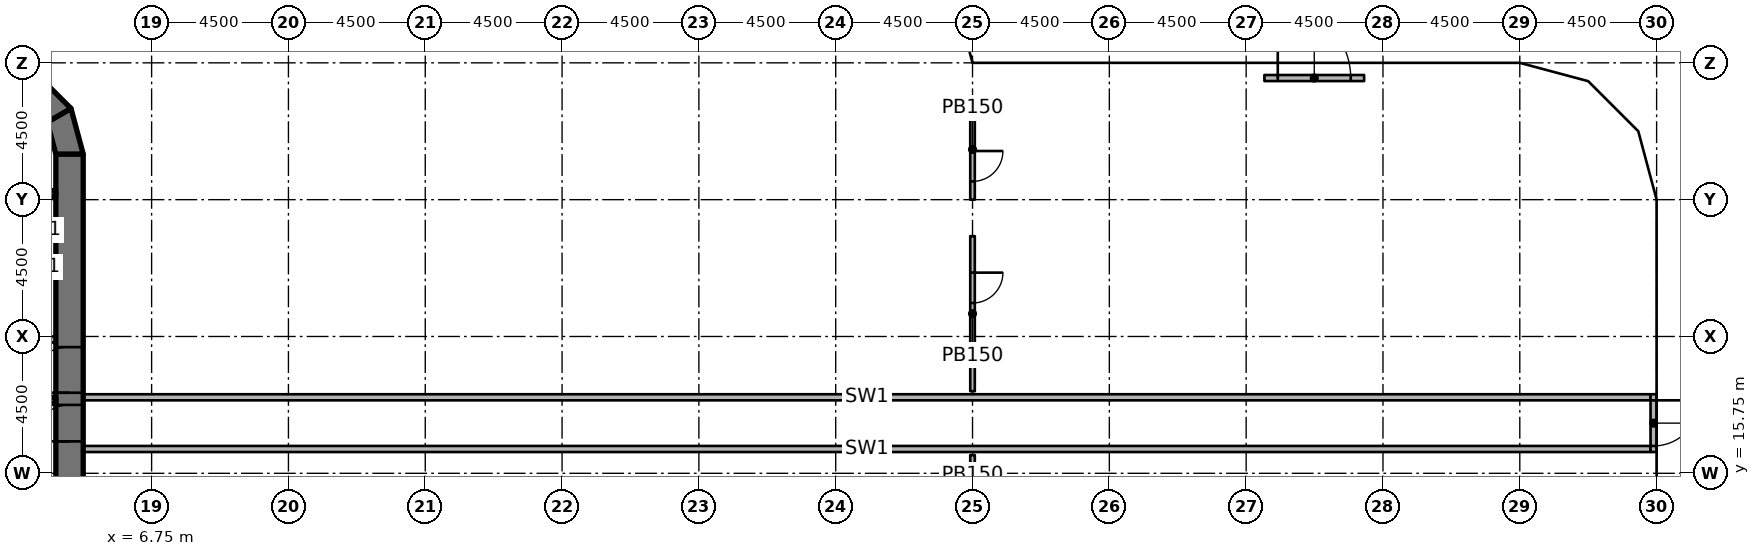
"""IFC4 building model, lengths in metres.
Left out: names, types, materials, properties, quantities, classifications, styles, units other than length and angle.
Written with IfcOpenShell. Run it as: python <this file> out.ifc"""

import sys

from ifc_helpers import new_model, si_unit, direction, frame, frame_2d, origin, origin_2d, place, context, subcontext, project, spatial, polyline, rectangle, outline, extrude, element, fill, save


model = new_model("IFC4")
c1 = context("Model", 3, precision=1e-05, world=origin(), true_north=direction((0.0, 1.0)))
c2 = subcontext(c1, "Body", "Model", "MODEL_VIEW")
j1 = project(units=[si_unit("LENGTHUNIT", "METRE"), si_unit("PLANEANGLEUNIT", "RADIAN")], contexts=[c1])
p1 = place(None, origin())
s1 = spatial("IfcSite", under=j1, at=p1, CompositionType="ELEMENT")
p2 = place(p1, origin())
s2 = spatial("IfcBuilding", under=s1, at=p2, CompositionType="ELEMENT")
p3 = place(p2, origin())
s3 = spatial("IfcBuildingStorey", under=s2, at=p3, CompositionType="ELEMENT", Elevation=0.0)
for number, where, z_axis, x_axis in (
    (1, (6.25, 15.75, 0.0), (0.0, 0.0, 1.0), (1.0, 0.0, 0.0)),
    (2, (6.25, 20.25, 0.0), (0.0, 0.0, 1.0), (1.0, 0.0, 0.0)),
    (3, (6.25, 24.65, 0.0), (0.0, 0.0, 1.0), (1.0, 0.0, 0.0)),
    (4, (6.25, 26.7, 0.0), (0.0, 0.0, 1.0), (1.0, 0.0, 0.0)),
    (5, (10.65, 15.15, 0.0), (0.0, 0.0, 1.0), (1.0, 0.0, 0.0)),
    (6, (10.65, 20.25, 0.0), (0.0, 0.0, 1.0), (1.0, 0.0, 0.0)),
    (7, (15.15, 19.65, 0.0), (0.0, 0.0, 1.0), (1.0, 0.0, 0.0)),
    (8, (15.15, 29.25, 0.0), (0.0, 0.0, 1.0), (1.0, 0.0, 0.0)),
    (9, (19.65, 15.15, 0.0), (0.0, 0.0, 1.0), (1.0, 0.0, 0.0)),
    (10, (19.65, 24.15, 0.0), (0.0, 0.0, 1.0), (1.0, 0.0, 0.0)),
    (11, (24.15, 19.65, 0.0), (0.0, 0.0, 1.0), (1.0, 0.0, 0.0)),
    (12, (24.15, 28.65, 0.0), (0.0, 0.0, 1.0), (1.0, 0.0, 0.0)),
    (13, (29.25, 15.15, 0.0), (0.0, 0.0, 1.0), (1.0, 0.0, 0.0)),
    (14, (28.65, 24.15, 0.0), (0.0, 0.0, 1.0), (1.0, 0.0, 0.0)),
    (15, (33.75, 24.15, 0.0), (0.0, 0.0, 1.0), (1.0, 0.0, 0.0)),
    (16, (33.15, 28.65, 0.0), (0.0, 0.0, 1.0), (1.0, 0.0, 0.0)),
    (17, (38.25, 19.65, 0.0), (0.0, 0.0, 1.0), (1.0, 0.0, 0.0)),
    (18, (42.75, 28.65, 0.0), (0.0, 0.0, 1.0), (1.0, 0.0, 0.0)),
    (19, (47.25, 23.97, 0.0), (0.0, 0.0, 1.0), (1.0, 0.0, 0.0)),
    (20, (50.97, 20.25, 0.0), (0.0, 0.0, 1.0), (1.0, 0.0, 0.0)),
    (21, (55.65, 15.75, 0.0), (0.0, 0.0, 1.0), (1.0, 0.0, 0.0)),
):
    element("IfcColumn", number, at=place(p3, frame(where, z_axis=z_axis, x_axis=x_axis)), inside=s3, PredefinedType="COLUMN", context=c2, shape_type="SweptSolid", body=[
        extrude(rectangle(XDim=1.2, YDim=1.2, at=origin_2d()), origin(), (0.0, 0.0, 1.0), 6.55),
    ])
p4 = place(p3, frame((4.05, 11.25, 0.0), z_axis=(0.0, 0.0, 1.0), x_axis=(0.0, 1.0, 0.0)))
e22 = element("IfcWall", 22, at=p4, inside=s3, PredefinedType="SHEAR", context=c2, shape_type="SweptSolid", body=[
    extrude(rectangle(XDim=15.0, YDim=0.9, at=frame_2d((7.5, 0.0))), origin(), (0.0, 0.0, 1.0), 7.0),
])
p5 = place(p4, frame((7.15, 0.0, 0.0)))
e23 = element("IfcOpeningElement", 23, at=p5, cuts=e22, PredefinedType="OPENING", context=c2, shape_type="SweptSolid", body=[
    extrude(rectangle(XDim=1.5, YDim=2.3, at=frame_2d((0.75, 1.15))), frame((0.0, 0.46, 0.0), z_axis=(0.0, -1.0, 0.0), x_axis=(1.0, 0.0, 0.0)), (0.0, 0.0, 1.0), 0.92),
])
p6 = place(p4, frame((5.55, 0.0, 0.0)))
e24 = element("IfcOpeningElement", 24, at=p6, cuts=e22, PredefinedType="OPENING", context=c2, shape_type="SweptSolid", body=[
    extrude(rectangle(XDim=1.2, YDim=2.1, at=frame_2d((0.6, 1.05))), frame((0.0, 0.46, 0.0), z_axis=(0.0, -1.0, 0.0), x_axis=(1.0, 0.0, 0.0)), (0.0, 0.0, 1.0), 0.92),
])
p7 = place(p3, origin())
e25 = element("IfcWall", 25, at=p7, inside=s3, PredefinedType="SHEAR", context=c2, shape_type="SweptSolid", body=[
    extrude(outline(polyline([(4.5, 26.25), (4.098, 27.75), (3.319, 27.3), (3.6, 26.25), (4.5, 26.25)])), origin(), (0.0, 0.0, 1.0), 7.0),
])
p8 = place(p3, origin())
e26 = element("IfcWall", 26, at=p8, inside=s3, PredefinedType="SHEAR", context=c2, shape_type="SweptSolid", body=[
    extrude(outline(polyline([(4.098, 27.75), (3.0, 28.848), (2.55, 28.069), (3.319, 27.3), (4.098, 27.75)])), origin(), (0.0, 0.0, 1.0), 7.0),
])
p9 = place(p3, frame((43.35, 28.75, 0.0), z_axis=(0.0, 0.0, 1.0), x_axis=(1.0, 0.0, 0.0)))
e27 = element("IfcWall", 27, at=p9, inside=s3, PredefinedType="SOLIDWALL", context=c2, shape_type="SweptSolid", body=[
    extrude(rectangle(XDim=3.28, YDim=0.2, at=frame_2d((1.64, 0.0))), origin(), (0.0, 0.0, 1.0), 5.6),
])
p10 = place(p9, frame((0.44, 0.0, 0.0)))
e28 = element("IfcOpeningElement", 28, at=p10, cuts=e27, PredefinedType="OPENING", context=c2, shape_type="SweptSolid", body=[
    extrude(rectangle(XDim=2.4, YDim=2.7, at=frame_2d((1.2, 1.35))), frame((0.0, 0.11, 0.0), z_axis=(0.0, -1.0, 0.0), x_axis=(1.0, 0.0, 0.0)), (0.0, 0.0, 1.0), 0.22),
])
for number, where, z_axis, x_axis in (
    (29, (-3.6, 24.95, 0.0), (0.0, 0.0, 1.0), (1.0, 0.0, 0.0)),
    (30, (-3.6, 18.15, 0.0), (0.0, 0.0, 1.0), (1.0, 0.0, 0.0)),
):
    element("IfcWall", number, at=place(p3, frame(where, z_axis=z_axis, x_axis=x_axis)), inside=s3, PredefinedType="SHEAR", context=c2, shape_type="SweptSolid", body=[
        extrude(rectangle(XDim=7.2, YDim=0.2, at=frame_2d((3.6, 0.0))), origin(), (0.0, 0.0, 1.0), 6.55),
    ])
p11 = place(p3, frame((0.9, 20.15, 0.0), z_axis=(0.0, 0.0, 1.0), x_axis=(1.0, 0.0, 0.0)))
e31 = element("IfcWall", 31, at=p11, inside=s3, PredefinedType="PARTITIONING", context=c2, shape_type="SweptSolid", body=[
    extrude(rectangle(XDim=2.7, YDim=0.2, at=frame_2d((1.35, 0.0))), origin(), (0.0, 0.0, 1.0), 6.55),
])
p12 = place(p3, frame((1.1, 22.55, 0.0), z_axis=(0.0, 0.0, 1.0), x_axis=(1.0, 0.0, 0.0)))
e32 = element("IfcWall", 32, at=p12, inside=s3, PredefinedType="PARTITIONING", context=c2, shape_type="SweptSolid", body=[
    extrude(rectangle(XDim=2.5, YDim=0.2, at=frame_2d((1.25, 0.0))), origin(), (0.0, 0.0, 1.0), 6.55),
])
for number, where, z_axis, x_axis in (
    (33, (4.5, 18.25, 0.0), (0.0, 0.0, 1.0), (1.0, 0.0, 0.0)),
    (34, (4.5, 16.55, 0.0), (0.0, 0.0, 1.0), (1.0, 0.0, 0.0)),
):
    element("IfcWall", number, at=place(p3, frame(where, z_axis=z_axis, x_axis=x_axis)), inside=s3, PredefinedType="PARTITIONING", context=c2, shape_type="SweptSolid", body=[
        extrude(rectangle(XDim=51.55, YDim=0.2, at=frame_2d((25.775, 0.0))), origin(), (0.0, 0.0, 1.0), 6.55),
    ])
p13 = place(p3, frame((56.15, 18.35, 0.0), z_axis=(0.0, 0.0, 1.0), x_axis=(0.0, -1.0, 0.0)))
e35 = element("IfcWall", 35, at=p13, inside=s3, PredefinedType="PARTITIONING", context=c2, shape_type="SweptSolid", body=[
    extrude(rectangle(XDim=1.9, YDim=0.2, at=frame_2d((0.95, 0.0))), origin(), (0.0, 0.0, 1.0), 6.55),
])
p14 = place(p13, frame((0.2, 0.0, 0.0)))
e36 = element("IfcOpeningElement", 36, at=p14, cuts=e35, PredefinedType="OPENING", context=c2, shape_type="SweptSolid", body=[
    extrude(rectangle(XDim=1.5, YDim=2.1, at=frame_2d((0.75, 1.05))), frame((0.0, 0.11, 0.0), z_axis=(0.0, -1.0, 0.0), x_axis=(1.0, 0.0, 0.0)), (0.0, 0.0, 1.0), 0.22),
])
p15 = place(p3, frame((33.75, 23.55, 0.0), z_axis=(0.0, 0.0, 1.0), x_axis=(0.0, -1.0, 0.0)))
e37 = element("IfcWall", 37, at=p15, inside=s3, PredefinedType="PARTITIONING", context=c2, shape_type="SweptSolid", body=[
    extrude(rectangle(XDim=5.1, YDim=0.15, at=frame_2d((2.55, 0.0))), origin(), (0.0, 0.0, 1.0), 6.55),
])
p16 = place(p15, frame((1.2, 0.0, 0.0)))
e38 = element("IfcOpeningElement", 38, at=p16, cuts=e37, PredefinedType="OPENING", context=c2, shape_type="SweptSolid", body=[
    extrude(rectangle(XDim=1.0, YDim=2.1, at=frame_2d((0.5, 1.05))), frame((0.0, 0.085, 0.0), z_axis=(0.0, -1.0, 0.0), x_axis=(1.0, 0.0, 0.0)), (0.0, 0.0, 1.0), 0.17),
])
p17 = place(p3, frame((33.75, 28.05, 0.0), z_axis=(0.0, 0.0, 1.0), x_axis=(0.0, -1.0, 0.0)))
e39 = element("IfcWall", 39, at=p17, inside=s3, PredefinedType="PARTITIONING", context=c2, shape_type="SweptSolid", body=[
    extrude(rectangle(XDim=3.3, YDim=0.15, at=frame_2d((1.65, 0.0))), origin(), (0.0, 0.0, 1.0), 6.55),
])
p18 = place(p17, frame((1.7, 0.0, 0.0)))
e40 = element("IfcOpeningElement", 40, at=p18, cuts=e39, PredefinedType="OPENING", context=c2, shape_type="SweptSolid", body=[
    extrude(rectangle(XDim=1.0, YDim=2.1, at=frame_2d((0.5, 1.05))), frame((0.0, 0.085, 0.0), z_axis=(0.0, -1.0, 0.0), x_axis=(1.0, 0.0, 0.0)), (0.0, 0.0, 1.0), 0.17),
])
p19 = place(p3, frame((33.75, 16.35, 0.0), z_axis=(0.0, 0.0, 1.0), x_axis=(0.0, -1.0, 0.0)))
e41 = element("IfcWall", 41, at=p19, inside=s3, PredefinedType="PARTITIONING", context=c2, shape_type="SweptSolid", body=[
    extrude(rectangle(XDim=5.28, YDim=0.15, at=frame_2d((2.64, 0.0))), origin(), (0.0, 0.0, 1.0), 6.55),
])
p20 = place(p19, frame((2.19, 0.0, 0.0)))
e42 = element("IfcOpeningElement", 42, at=p20, cuts=e41, PredefinedType="OPENING", context=c2, shape_type="SweptSolid", body=[
    extrude(rectangle(XDim=0.9, YDim=2.1, at=frame_2d((0.45, 1.05))), frame((0.0, 0.085, 0.0), z_axis=(0.0, -1.0, 0.0), x_axis=(1.0, 0.0, 0.0)), (0.0, 0.0, 1.0), 0.17),
])
p21 = place(p10, origin())
e43 = element("IfcDoor", 43, at=p21, inside=s3, OperationType="SINGLE_SWING_LEFT", PredefinedType="DOOR", context=c2, shape_type="SweptSolid", body=[
    extrude(rectangle(XDim=2.4, YDim=2.7, at=frame_2d((1.2, 1.35))), frame((0.0, 0.025, 0.0), z_axis=(0.0, -1.0, 0.0), x_axis=(1.0, 0.0, 0.0)), (0.0, 0.0, 1.0), 0.05),
])
fill(e28, e43)
p22 = place(p5, origin())
e44 = element("IfcDoor", 44, at=p22, inside=s3, OperationType="DOUBLE_DOOR_SINGLE_SWING", PredefinedType="DOOR", context=c2, shape_type="SweptSolid", body=[
    extrude(rectangle(XDim=1.5, YDim=2.3, at=frame_2d((0.75, 1.15))), frame((0.0, 0.025, 0.0), z_axis=(0.0, -1.0, 0.0), x_axis=(1.0, 0.0, 0.0)), (0.0, 0.0, 1.0), 0.05),
])
fill(e23, e44)
p23 = place(p6, origin())
e45 = element("IfcDoor", 45, at=p23, inside=s3, OperationType="SINGLE_SWING_RIGHT", PredefinedType="DOOR", context=c2, shape_type="SweptSolid", body=[
    extrude(rectangle(XDim=1.2, YDim=2.1, at=frame_2d((0.6, 1.05))), frame((0.0, 0.025, 0.0), z_axis=(0.0, -1.0, 0.0), x_axis=(1.0, 0.0, 0.0)), (0.0, 0.0, 1.0), 0.05),
])
fill(e24, e45)
p24 = place(p14, origin())
e46 = element("IfcDoor", 46, at=p24, inside=s3, OperationType="DOUBLE_DOOR_DOUBLE_SWING", PredefinedType="DOOR", context=c2, shape_type="SweptSolid", body=[
    extrude(rectangle(XDim=1.5, YDim=2.1, at=frame_2d((0.75, 1.05))), frame((0.0, 0.025, 0.0), z_axis=(0.0, -1.0, 0.0), x_axis=(1.0, 0.0, 0.0)), (0.0, 0.0, 1.0), 0.05),
])
fill(e36, e46)
p25 = place(p16, origin())
e47 = element("IfcDoor", 47, at=p25, inside=s3, OperationType="SINGLE_SWING_LEFT", PredefinedType="DOOR", context=c2, shape_type="SweptSolid", body=[
    extrude(rectangle(XDim=1.0, YDim=2.1, at=frame_2d((0.5, 1.05))), frame((0.0, 0.025, 0.0), z_axis=(0.0, -1.0, 0.0), x_axis=(1.0, 0.0, 0.0)), (0.0, 0.0, 1.0), 0.05),
])
fill(e38, e47)
p26 = place(p18, origin())
e48 = element("IfcDoor", 48, at=p26, inside=s3, OperationType="SINGLE_SWING_LEFT", PredefinedType="DOOR", context=c2, shape_type="SweptSolid", body=[
    extrude(rectangle(XDim=1.0, YDim=2.1, at=frame_2d((0.5, 1.05))), frame((0.0, 0.025, 0.0), z_axis=(0.0, -1.0, 0.0), x_axis=(1.0, 0.0, 0.0)), (0.0, 0.0, 1.0), 0.05),
])
fill(e40, e48)
save(model, sys.argv[1])
